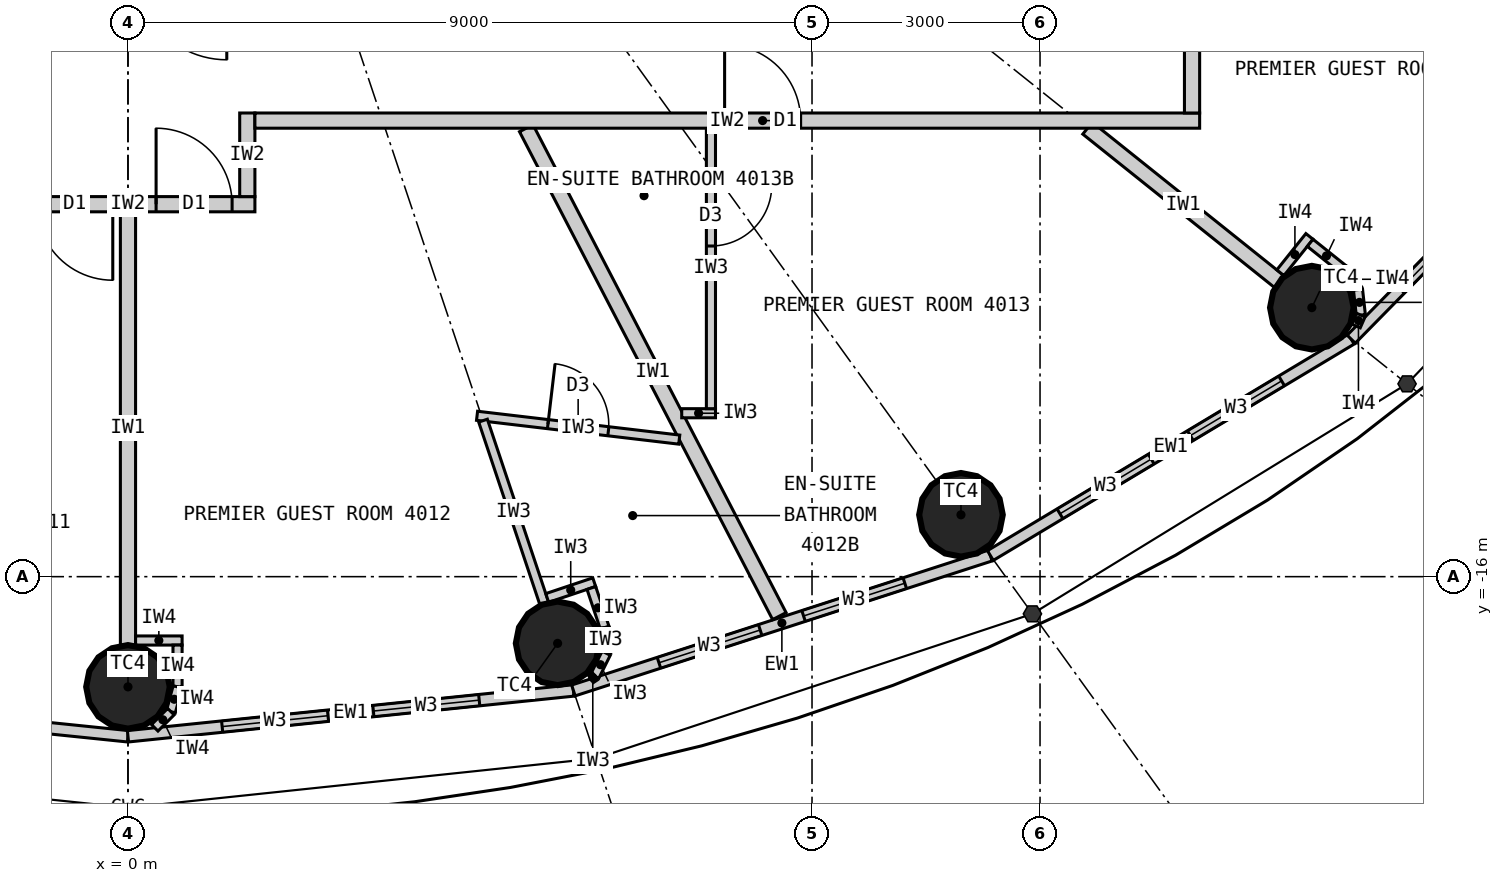
"""IFC4 building model, lengths in metres.
Left out: names, types, materials, properties, quantities, classifications, styles, units other than length and angle.
Written with IfcOpenShell. Run it as: python <this file> out.ifc"""

import sys

from ifc_helpers import new_model, si_unit, direction, frame, frame_2d, origin, origin_2d, place, context, subcontext, project, spatial, rectangle, circle, extrude, element, fill, save


model = new_model("IFC4")
c1 = context("Model", 3, precision=1e-05, world=origin(), true_north=direction((0.0, 1.0)))
c2 = subcontext(c1, "Body", "Model", "MODEL_VIEW")
j1 = project(units=[si_unit("LENGTHUNIT", "METRE"), si_unit("PLANEANGLEUNIT", "RADIAN")], contexts=[c1])
p1 = place(None, origin())
s1 = spatial("IfcSite", under=j1, at=p1, CompositionType="ELEMENT")
p2 = place(p1, origin())
s2 = spatial("IfcBuilding", under=s1, at=p2, CompositionType="ELEMENT")
p3 = place(p2, frame((0.0, 0.0, 153.3)))
s3 = spatial("IfcBuildingStorey", under=s2, at=p3, CompositionType="ELEMENT", Elevation=153.3)
for number, where, z_axis, x_axis in (
    (1, (0.0, -17.45, 0.0), (0.0, 0.0, 1.0), (1.0, 0.0, 0.0)),
    (2, (5.653, -16.877, 0.0), (0.0, 0.0, 1.0), (1.0, 0.0, 0.0)),
    (3, (10.96, -15.186, 0.0), (0.0, 0.0, 1.0), (1.0, 0.0, 0.0)),
    (4, (15.576, -12.461, 0.0), (0.0, 0.0, 1.0), (1.0, 0.0, 0.0)),
):
    element("IfcColumn", number, at=place(p3, frame(where, z_axis=z_axis, x_axis=x_axis)), inside=s3, PredefinedType="COLUMN", context=c2, shape_type="SweptSolid", body=[
        extrude(circle(Radius=0.55, at=origin_2d()), origin(), (0.0, 0.0, 1.0), 3.3),
    ])
p4 = place(p3, frame((-5.86, -17.497, 0.0), z_axis=(0.0, 0.0, 1.0), x_axis=(0.994751738032, -0.102318032045, 0.0)))
e5 = element("IfcWall", 5, at=p4, inside=s3, PredefinedType="ELEMENTEDWALL", context=c2, shape_type="SweptSolid", body=[
    extrude(rectangle(XDim=5.891, YDim=0.15, at=frame_2d((2.946, 0.0))), origin(), (0.0, 0.0, 1.0), 3.12),
])
p5 = place(p4, frame((1.246, 0.0, 0.9)))
e6 = element("IfcOpeningElement", 6, at=p5, cuts=e5, PredefinedType="OPENING", context=c2, shape_type="SweptSolid", body=[
    extrude(rectangle(XDim=1.4, YDim=1.9, at=frame_2d((0.7, 0.95))), frame((0.0, 0.085, 0.0), z_axis=(0.0, -1.0, 0.0), x_axis=(1.0, 0.0, 0.0)), (0.0, 0.0, 1.0), 0.17),
])
p6 = place(p4, frame((3.246, 0.0, 0.9)))
e7 = element("IfcOpeningElement", 7, at=p6, cuts=e5, PredefinedType="OPENING", context=c2, shape_type="SweptSolid", body=[
    extrude(rectangle(XDim=1.4, YDim=1.9, at=frame_2d((0.7, 0.95))), frame((0.0, 0.085, 0.0), z_axis=(0.0, -1.0, 0.0), x_axis=(1.0, 0.0, 0.0)), (0.0, 0.0, 1.0), 0.17),
])
p7 = place(p3, frame((0.0, -18.1, 0.0), z_axis=(0.0, 0.0, 1.0), x_axis=(0.994751738032, 0.102318032045, 0.0)))
e8 = element("IfcWall", 8, at=p7, inside=s3, PredefinedType="ELEMENTEDWALL", context=c2, shape_type="SweptSolid", body=[
    extrude(rectangle(XDim=5.891, YDim=0.15, at=frame_2d((2.946, 0.0))), origin(), (0.0, 0.0, 1.0), 3.12),
])
p8 = place(p7, frame((1.246, 0.0, 0.9)))
e9 = element("IfcOpeningElement", 9, at=p8, cuts=e8, PredefinedType="OPENING", context=c2, shape_type="SweptSolid", body=[
    extrude(rectangle(XDim=1.4, YDim=1.9, at=frame_2d((0.7, 0.95))), frame((0.0, 0.085, 0.0), z_axis=(0.0, -1.0, 0.0), x_axis=(1.0, 0.0, 0.0)), (0.0, 0.0, 1.0), 0.17),
])
p9 = place(p7, frame((3.246, 0.0, 0.9)))
e10 = element("IfcOpeningElement", 10, at=p9, cuts=e8, PredefinedType="OPENING", context=c2, shape_type="SweptSolid", body=[
    extrude(rectangle(XDim=1.4, YDim=1.9, at=frame_2d((0.7, 0.95))), frame((0.0, 0.085, 0.0), z_axis=(0.0, -1.0, 0.0), x_axis=(1.0, 0.0, 0.0)), (0.0, 0.0, 1.0), 0.17),
])
p10 = place(p3, frame((5.86, -17.497, 0.0), z_axis=(0.0, 0.0, 1.0), x_axis=(0.951432482129, 0.307857486429, 0.0)))
e11 = element("IfcWall", 11, at=p10, inside=s3, PredefinedType="ELEMENTEDWALL", context=c2, shape_type="SweptSolid", body=[
    extrude(rectangle(XDim=5.766, YDim=0.15, at=frame_2d((2.883, 0.0))), origin(), (0.0, 0.0, 1.0), 3.12),
])
p11 = place(p10, frame((1.183, 0.0, 0.9)))
e12 = element("IfcOpeningElement", 12, at=p11, cuts=e11, PredefinedType="OPENING", context=c2, shape_type="SweptSolid", body=[
    extrude(rectangle(XDim=1.4, YDim=1.9, at=frame_2d((0.7, 0.95))), frame((0.0, 0.085, 0.0), z_axis=(0.0, -1.0, 0.0), x_axis=(1.0, 0.0, 0.0)), (0.0, 0.0, 1.0), 0.17),
])
p12 = place(p10, frame((3.183, 0.0, 0.9)))
e13 = element("IfcOpeningElement", 13, at=p12, cuts=e11, PredefinedType="OPENING", context=c2, shape_type="SweptSolid", body=[
    extrude(rectangle(XDim=1.4, YDim=1.9, at=frame_2d((0.7, 0.95))), frame((0.0, 0.085, 0.0), z_axis=(0.0, -1.0, 0.0), x_axis=(1.0, 0.0, 0.0)), (0.0, 0.0, 1.0), 0.17),
])
p13 = place(p3, frame((11.346, -15.722, 0.0), z_axis=(0.0, 0.0, 1.0), x_axis=(0.857695199231, 0.514158482587, 0.0)))
e14 = element("IfcWall", 14, at=p13, inside=s3, PredefinedType="ELEMENTEDWALL", context=c2, shape_type="SweptSolid", body=[
    extrude(rectangle(XDim=5.536, YDim=0.15, at=frame_2d((2.768, 0.0))), origin(), (0.0, 0.0, 1.0), 3.12),
])
p14 = place(p13, frame((1.068, 0.0, 0.9)))
e15 = element("IfcOpeningElement", 15, at=p14, cuts=e14, PredefinedType="OPENING", context=c2, shape_type="SweptSolid", body=[
    extrude(rectangle(XDim=1.4, YDim=1.9, at=frame_2d((0.7, 0.95))), frame((0.0, 0.085, 0.0), z_axis=(0.0, -1.0, 0.0), x_axis=(1.0, 0.0, 0.0)), (0.0, 0.0, 1.0), 0.17),
])
p15 = place(p13, frame((3.068, 0.0, 0.9)))
e16 = element("IfcOpeningElement", 16, at=p15, cuts=e14, PredefinedType="OPENING", context=c2, shape_type="SweptSolid", body=[
    extrude(rectangle(XDim=1.4, YDim=1.9, at=frame_2d((0.7, 0.95))), frame((0.0, 0.085, 0.0), z_axis=(0.0, -1.0, 0.0), x_axis=(1.0, 0.0, 0.0)), (0.0, 0.0, 1.0), 0.17),
])
p16 = place(p3, frame((16.095, -12.876, 0.0), z_axis=(0.0, 0.0, 1.0), x_axis=(0.700727467776, 0.71342905457, 0.0)))
e17 = element("IfcWall", 17, at=p16, inside=s3, PredefinedType="ELEMENTEDWALL", context=c2, shape_type="SweptSolid", body=[
    extrude(rectangle(XDim=5.247, YDim=0.15, at=frame_2d((2.624, 0.0))), origin(), (0.0, 0.0, 1.0), 3.12),
])
p17 = place(p16, frame((0.924, 0.0, 0.9)))
e18 = element("IfcOpeningElement", 18, at=p17, cuts=e17, PredefinedType="OPENING", context=c2, shape_type="SweptSolid", body=[
    extrude(rectangle(XDim=1.4, YDim=1.9, at=frame_2d((0.7, 0.95))), frame((0.0, 0.085, 0.0), z_axis=(0.0, -1.0, 0.0), x_axis=(1.0, 0.0, 0.0)), (0.0, 0.0, 1.0), 0.17),
])
p18 = place(p16, frame((2.924, 0.0, 0.9)))
e19 = element("IfcOpeningElement", 19, at=p18, cuts=e17, PredefinedType="OPENING", context=c2, shape_type="SweptSolid", body=[
    extrude(rectangle(XDim=1.4, YDim=1.9, at=frame_2d((0.7, 0.95))), frame((0.0, 0.085, 0.0), z_axis=(0.0, -1.0, 0.0), x_axis=(1.0, 0.0, 0.0)), (0.0, 0.0, 1.0), 0.17),
])
p19 = place(p3, frame((0.0, -11.2, 0.0), z_axis=(0.0, 0.0, 1.0), x_axis=(0.0, -1.0, 0.0)))
e20 = element("IfcWall", 20, at=p19, inside=s3, PredefinedType="PARTITIONING", context=c2, shape_type="SweptSolid", body=[
    extrude(rectangle(XDim=5.7, YDim=0.2, at=frame_2d((2.85, 0.0))), origin(), (0.0, 0.0, 1.0), 2.42),
])
p20 = place(p3, frame((5.24, -10.1, 0.0), z_axis=(0.0, 0.0, 1.0), x_axis=(0.460532965373, -0.887642601391, 0.0)))
e21 = element("IfcWall", 21, at=p20, inside=s3, PredefinedType="PARTITIONING", context=c2, shape_type="SweptSolid", body=[
    extrude(rectangle(XDim=7.231, YDim=0.2, at=frame_2d((3.616, 0.0))), origin(), (0.0, 0.0, 1.0), 3.12),
])
p21 = place(p3, frame((12.625, -10.1, 0.0), z_axis=(0.0, 0.0, 1.0), x_axis=(0.780876185034, -0.624685827954, 0.0)))
e22 = element("IfcWall", 22, at=p21, inside=s3, PredefinedType="PARTITIONING", context=c2, shape_type="SweptSolid", body=[
    extrude(rectangle(XDim=3.229, YDim=0.2, at=frame_2d((1.615, 0.0))), origin(), (0.0, 0.0, 1.0), 2.42),
])
p22 = place(p3, frame((1.67, -11.1, 0.0), z_axis=(0.0, 0.0, 1.0), x_axis=(-1.0, 0.0, 0.0)))
e23 = element("IfcWall", 23, at=p22, inside=s3, PredefinedType="PARTITIONING", context=c2, shape_type="SweptSolid", body=[
    extrude(rectangle(XDim=3.34, YDim=0.2, at=frame_2d((1.67, 0.0))), origin(), (0.0, 0.0, 1.0), 3.12),
])
p23 = place(p22, frame((1.87, 0.0, 0.0)))
e24 = element("IfcOpeningElement", 24, at=p23, cuts=e23, PredefinedType="OPENING", context=c2, shape_type="SweptSolid", body=[
    extrude(rectangle(XDim=1.0, YDim=2.2, at=frame_2d((0.5, 1.1))), frame((0.0, 0.11, 0.0), z_axis=(0.0, -1.0, 0.0), x_axis=(1.0, 0.0, 0.0)), (0.0, 0.0, 1.0), 0.22),
])
p24 = place(p22, frame((0.3, 0.0, 0.0)))
e25 = element("IfcOpeningElement", 25, at=p24, cuts=e23, PredefinedType="OPENING", context=c2, shape_type="SweptSolid", body=[
    extrude(rectangle(XDim=1.0, YDim=2.2, at=frame_2d((0.5, 1.1))), frame((0.0, 0.11, 0.0), z_axis=(0.0, -1.0, 0.0), x_axis=(1.0, 0.0, 0.0)), (0.0, 0.0, 1.0), 0.22),
])
p25 = place(p3, frame((1.57, -9.9, 0.0), z_axis=(0.0, 0.0, 1.0), x_axis=(0.0, -1.0, 0.0)))
e26 = element("IfcWall", 26, at=p25, inside=s3, PredefinedType="PARTITIONING", context=c2, shape_type="SweptSolid", body=[
    extrude(rectangle(XDim=1.1, YDim=0.2, at=frame_2d((0.55, 0.0))), origin(), (0.0, 0.0, 1.0), 3.12),
])
p26 = place(p3, frame((7.253, -14.197, 0.0), z_axis=(0.0, 0.0, 1.0), x_axis=(-0.993128188393, 0.117031625725, 0.0)))
e27 = element("IfcWall", 27, at=p26, inside=s3, PredefinedType="PARTITIONING", context=c2, shape_type="SweptSolid", body=[
    extrude(rectangle(XDim=2.678, YDim=0.12, at=frame_2d((1.339, 0.0))), origin(), (0.0, 0.0, 1.0), 3.12),
])
p27 = place(p26, frame((0.939, 0.0, 0.0)))
e28 = element("IfcOpeningElement", 28, at=p27, cuts=e27, PredefinedType="OPENING", context=c2, shape_type="SweptSolid", body=[
    extrude(rectangle(XDim=0.8, YDim=2.1, at=frame_2d((0.4, 1.05))), frame((0.0, 0.07, 0.0), z_axis=(0.0, -1.0, 0.0), x_axis=(1.0, 0.0, 0.0)), (0.0, 0.0, 1.0), 0.14),
])
p28 = place(p3, frame((4.671, -13.948, 0.0), z_axis=(0.0, 0.0, 1.0), x_axis=(0.317669167093, -0.948201613729, 0.0)))
e29 = element("IfcWall", 29, at=p28, inside=s3, PredefinedType="PARTITIONING", context=c2, shape_type="SweptSolid", body=[
    extrude(rectangle(XDim=2.54, YDim=0.12, at=frame_2d((1.27, 0.0))), origin(), (0.0, 0.0, 1.0), 2.42),
])
p29 = place(p3, frame((5.516, -16.28, 0.0), z_axis=(0.0, 0.0, 1.0), x_axis=(0.948157944392, 0.317799484717, 0.0)))
e30 = element("IfcWall", 30, at=p29, inside=s3, PredefinedType="PARTITIONING", context=c2, shape_type="SweptSolid", body=[
    extrude(rectangle(XDim=0.652, YDim=0.12, at=frame_2d((0.326, 0.0))), origin(), (0.0, 0.0, 1.0), 3.12),
])
p30 = place(p3, frame((6.097, -16.149, 0.0), z_axis=(0.0, 0.0, 1.0), x_axis=(0.317292604854, -0.948327687514, 0.0)))
e31 = element("IfcWall", 31, at=p30, inside=s3, PredefinedType="PARTITIONING", context=c2, shape_type="SweptSolid", body=[
    extrude(rectangle(XDim=0.55, YDim=0.12, at=frame_2d((0.275, 0.0))), origin(), (0.0, 0.0, 1.0), 3.12),
])
for number, where, z_axis, x_axis in (
    (32, (6.271, -16.67, 0.0), (0.0, 0.0, 1.0), (0.061, -0.998, 0.0)),
    (33, (6.292, -17.007, 0.0), (0.0, 0.0, 1.0), (-0.445, -0.895, 0.0)),
):
    element("IfcWall", number, at=place(p3, frame(where, z_axis=z_axis, x_axis=x_axis)), inside=s3, PredefinedType="PARTITIONING", context=c2, shape_type="SweptSolid", body=[
        extrude(rectangle(XDim=0.338, YDim=0.12, at=frame_2d((0.169, 0.0))), origin(), (0.0, 0.0, 1.0), 3.12),
    ])
p31 = place(p3, frame((6.142, -17.31, 0.0), z_axis=(0.0, 0.0, 1.0), x_axis=(-0.835039693181, -0.550189704386, 0.0)))
e34 = element("IfcWall", 34, at=p31, inside=s3, PredefinedType="PARTITIONING", context=c2, shape_type="SweptSolid", body=[
    extrude(rectangle(XDim=0.062, YDim=0.12, at=frame_2d((0.031, 0.0))), origin(), (0.0, 0.0, 1.0), 3.12),
])
p32 = place(p3, frame((7.286, -13.85, 0.0), z_axis=(0.0, 0.0, 1.0), x_axis=(1.0, 0.0, 0.0)))
e35 = element("IfcWall", 35, at=p32, inside=s3, PredefinedType="PARTITIONING", context=c2, shape_type="SweptSolid", body=[
    extrude(rectangle(XDim=0.444, YDim=0.12, at=frame_2d((0.222, 0.0))), origin(), (0.0, 0.0, 1.0), 3.12),
])
p33 = place(p3, frame((7.67, -10.1, 0.0), z_axis=(0.0, 0.0, 1.0), x_axis=(0.0, -1.0, 0.0)))
e36 = element("IfcWall", 36, at=p33, inside=s3, PredefinedType="PARTITIONING", context=c2, shape_type="SweptSolid", body=[
    extrude(rectangle(XDim=3.69, YDim=0.12, at=frame_2d((1.845, 0.0))), origin(), (0.0, 0.0, 1.0), 3.12),
])
p34 = place(p33, frame((0.75, 0.0, 0.0)))
e37 = element("IfcOpeningElement", 37, at=p34, cuts=e36, PredefinedType="OPENING", context=c2, shape_type="SweptSolid", body=[
    extrude(rectangle(XDim=0.8, YDim=2.1, at=frame_2d((0.4, 1.05))), frame((0.0, 0.07, 0.0), z_axis=(0.0, -1.0, 0.0), x_axis=(1.0, 0.0, 0.0)), (0.0, 0.0, 1.0), 0.14),
])
p35 = place(p3, frame((14.1, -10.0, 0.0), z_axis=(0.0, 0.0, 1.0), x_axis=(-1.0, 0.0, 0.0)))
e38 = element("IfcWall", 38, at=p35, inside=s3, PredefinedType="PARTITIONING", context=c2, shape_type="SweptSolid", body=[
    extrude(rectangle(XDim=12.43, YDim=0.2, at=frame_2d((6.215, 0.0))), origin(), (0.0, 0.0, 1.0), 3.12),
])
p36 = place(p35, frame((5.25, 0.0, 0.0)))
e39 = element("IfcOpeningElement", 39, at=p36, cuts=e38, PredefinedType="OPENING", context=c2, shape_type="SweptSolid", body=[
    extrude(rectangle(XDim=1.0, YDim=2.2, at=frame_2d((0.5, 1.1))), frame((0.0, 0.11, 0.0), z_axis=(0.0, -1.0, 0.0), x_axis=(1.0, 0.0, 0.0)), (0.0, 0.0, 1.0), 0.22),
])
p37 = place(p3, frame((14.0, -9.9, 0.0), z_axis=(0.0, 0.0, 1.0), x_axis=(0.0, 1.0, 0.0)))
e40 = element("IfcWall", 40, at=p37, inside=s3, PredefinedType="PARTITIONING", context=c2, shape_type="SweptSolid", body=[
    extrude(rectangle(XDim=8.23, YDim=0.2, at=frame_2d((4.115, 0.0))), origin(), (0.0, 0.0, 1.0), 3.12),
])
p38 = place(p37, frame((1.678, 0.0, 0.0)))
e41 = element("IfcOpeningElement", 41, at=p38, cuts=e40, PredefinedType="OPENING", context=c2, shape_type="SweptSolid", body=[
    extrude(rectangle(XDim=1.0, YDim=2.2, at=frame_2d((0.5, 1.1))), frame((0.0, 0.11, 0.0), z_axis=(0.0, -1.0, 0.0), x_axis=(1.0, 0.0, 0.0)), (0.0, 0.0, 1.0), 0.22),
])
p39 = place(p3, frame((0.1, -16.84, 0.0), z_axis=(0.0, 0.0, 1.0), x_axis=(1.0, 0.0, 0.0)))
e42 = element("IfcWall", 42, at=p39, inside=s3, PredefinedType="PARTITIONING", context=c2, shape_type="SweptSolid", body=[
    extrude(rectangle(XDim=0.612, YDim=0.12, at=frame_2d((0.306, 0.0))), origin(), (0.0, 0.0, 1.0), 3.12),
])
p40 = place(p3, frame((0.652, -16.9, 0.0), z_axis=(0.0, 0.0, 1.0), x_axis=(0.0, -1.0, 0.0)))
e43 = element("IfcWall", 43, at=p40, inside=s3, PredefinedType="PARTITIONING", context=c2, shape_type="SweptSolid", body=[
    extrude(rectangle(XDim=0.55, YDim=0.12, at=frame_2d((0.275, 0.0))), origin(), (0.0, 0.0, 1.0), 3.12),
])
p41 = place(p3, frame((0.652, -17.45, 0.0), z_axis=(0.0, 0.0, 1.0), x_axis=(-0.258832454679, -0.965922233104, 0.0)))
e44 = element("IfcWall", 44, at=p41, inside=s3, PredefinedType="PARTITIONING", context=c2, shape_type="SweptSolid", body=[
    extrude(rectangle(XDim=0.338, YDim=0.12, at=frame_2d((0.169, 0.0))), origin(), (0.0, 0.0, 1.0), 3.12),
])
p42 = place(p3, frame((0.565, -17.776, 0.0), z_axis=(0.0, 0.0, 1.0), x_axis=(-0.707106781187, -0.707106781187, 0.0)))
e45 = element("IfcWall", 45, at=p42, inside=s3, PredefinedType="PARTITIONING", context=c2, shape_type="SweptSolid", body=[
    extrude(rectangle(XDim=0.301, YDim=0.12, at=frame_2d((0.15, 0.0))), origin(), (0.0, 0.0, 1.0), 3.12),
])
p43 = place(p3, frame((15.162, -12.002, 0.0), z_axis=(0.0, 0.0, 1.0), x_axis=(0.624597762427, 0.780946627607, 0.0)))
e46 = element("IfcWall", 46, at=p43, inside=s3, PredefinedType="PARTITIONING", context=c2, shape_type="SweptSolid", body=[
    extrude(rectangle(XDim=0.612, YDim=0.12, at=frame_2d((0.306, 0.0))), origin(), (0.0, 0.0, 1.0), 3.12),
])
p44 = place(p3, frame((15.554, -11.608, 0.0), z_axis=(0.0, 0.0, 1.0), x_axis=(0.780695577787, -0.624911525597, 0.0)))
e47 = element("IfcWall", 47, at=p44, inside=s3, PredefinedType="PARTITIONING", context=c2, shape_type="SweptSolid", body=[
    extrude(rectangle(XDim=0.55, YDim=0.12, at=frame_2d((0.275, 0.0))), origin(), (0.0, 0.0, 1.0), 3.12),
])
p45 = place(p3, frame((15.984, -11.952, 0.0), z_axis=(0.0, 0.0, 1.0), x_axis=(0.592335221171, -0.805691619517, 0.0)))
e48 = element("IfcWall", 48, at=p45, inside=s3, PredefinedType="PARTITIONING", context=c2, shape_type="SweptSolid", body=[
    extrude(rectangle(XDim=0.338, YDim=0.12, at=frame_2d((0.169, 0.0))), origin(), (0.0, 0.0, 1.0), 3.12),
])
p46 = place(p3, frame((16.184, -12.224, 0.0), z_axis=(0.0, 0.0, 1.0), x_axis=(0.110669692975, -0.993857242795, 0.0)))
e49 = element("IfcWall", 49, at=p46, inside=s3, PredefinedType="PARTITIONING", context=c2, shape_type="SweptSolid", body=[
    extrude(rectangle(XDim=0.337, YDim=0.12, at=frame_2d((0.169, 0.0))), origin(), (0.0, 0.0, 1.0), 3.12),
])
p47 = place(p3, frame((16.221, -12.559, 0.0), z_axis=(0.0, 0.0, 1.0), x_axis=(-0.401064416249, -0.916049853457, 0.0)))
e50 = element("IfcWall", 50, at=p47, inside=s3, PredefinedType="PARTITIONING", context=c2, shape_type="SweptSolid", body=[
    extrude(rectangle(XDim=0.156, YDim=0.12, at=frame_2d((0.078, 0.0))), origin(), (0.0, 0.0, 1.0), 3.12),
])
p48 = place(p8, origin())
e51 = element("IfcWindow", 51, at=p48, inside=s3, PartitioningType="SINGLE_PANEL", PredefinedType="WINDOW", context=c2, shape_type="SweptSolid", body=[
    extrude(rectangle(XDim=1.4, YDim=1.9, at=frame_2d((0.7, 0.95))), frame((0.0, 0.03, 0.0), z_axis=(0.0, -1.0, 0.0), x_axis=(1.0, 0.0, 0.0)), (0.0, 0.0, 1.0), 0.06),
])
fill(e9, e51)
p49 = place(p9, origin())
e52 = element("IfcWindow", 52, at=p49, inside=s3, PartitioningType="SINGLE_PANEL", PredefinedType="WINDOW", context=c2, shape_type="SweptSolid", body=[
    extrude(rectangle(XDim=1.4, YDim=1.9, at=frame_2d((0.7, 0.95))), frame((0.0, 0.03, 0.0), z_axis=(0.0, -1.0, 0.0), x_axis=(1.0, 0.0, 0.0)), (0.0, 0.0, 1.0), 0.06),
])
fill(e10, e52)
p50 = place(p11, origin())
e53 = element("IfcWindow", 53, at=p50, inside=s3, PartitioningType="SINGLE_PANEL", PredefinedType="WINDOW", context=c2, shape_type="SweptSolid", body=[
    extrude(rectangle(XDim=1.4, YDim=1.9, at=frame_2d((0.7, 0.95))), frame((0.0, 0.03, 0.0), z_axis=(0.0, -1.0, 0.0), x_axis=(1.0, 0.0, 0.0)), (0.0, 0.0, 1.0), 0.06),
])
fill(e12, e53)
p51 = place(p12, origin())
e54 = element("IfcWindow", 54, at=p51, inside=s3, PartitioningType="SINGLE_PANEL", PredefinedType="WINDOW", context=c2, shape_type="SweptSolid", body=[
    extrude(rectangle(XDim=1.4, YDim=1.9, at=frame_2d((0.7, 0.95))), frame((0.0, 0.03, 0.0), z_axis=(0.0, -1.0, 0.0), x_axis=(1.0, 0.0, 0.0)), (0.0, 0.0, 1.0), 0.06),
])
fill(e13, e54)
p52 = place(p14, origin())
e55 = element("IfcWindow", 55, at=p52, inside=s3, PartitioningType="SINGLE_PANEL", PredefinedType="WINDOW", context=c2, shape_type="SweptSolid", body=[
    extrude(rectangle(XDim=1.4, YDim=1.9, at=frame_2d((0.7, 0.95))), frame((0.0, 0.03, 0.0), z_axis=(0.0, -1.0, 0.0), x_axis=(1.0, 0.0, 0.0)), (0.0, 0.0, 1.0), 0.06),
])
fill(e15, e55)
p53 = place(p15, origin())
e56 = element("IfcWindow", 56, at=p53, inside=s3, PartitioningType="SINGLE_PANEL", PredefinedType="WINDOW", context=c2, shape_type="SweptSolid", body=[
    extrude(rectangle(XDim=1.4, YDim=1.9, at=frame_2d((0.7, 0.95))), frame((0.0, 0.03, 0.0), z_axis=(0.0, -1.0, 0.0), x_axis=(1.0, 0.0, 0.0)), (0.0, 0.0, 1.0), 0.06),
])
fill(e16, e56)
p54 = place(p17, origin())
e57 = element("IfcWindow", 57, at=p54, inside=s3, PartitioningType="SINGLE_PANEL", PredefinedType="WINDOW", context=c2, shape_type="SweptSolid", body=[
    extrude(rectangle(XDim=1.4, YDim=1.9, at=frame_2d((0.7, 0.95))), frame((0.0, 0.03, 0.0), z_axis=(0.0, -1.0, 0.0), x_axis=(1.0, 0.0, 0.0)), (0.0, 0.0, 1.0), 0.06),
])
fill(e18, e57)
p55 = place(p23, origin())
e58 = element("IfcDoor", 58, at=p55, inside=s3, OperationType="SINGLE_SWING_LEFT", PredefinedType="DOOR", context=c2, shape_type="SweptSolid", body=[
    extrude(rectangle(XDim=1.0, YDim=2.2, at=frame_2d((0.5, 1.1))), frame((0.0, 0.025, 0.0), z_axis=(0.0, -1.0, 0.0), x_axis=(1.0, 0.0, 0.0)), (0.0, 0.0, 1.0), 0.05),
])
fill(e24, e58)
p56 = place(p27, origin())
e59 = element("IfcDoor", 59, at=p56, inside=s3, OperationType="SINGLE_SWING_RIGHT", PredefinedType="DOOR", context=c2, shape_type="SweptSolid", body=[
    extrude(rectangle(XDim=0.8, YDim=2.1, at=frame_2d((0.4, 1.05))), frame((0.0, 0.025, 0.0), z_axis=(0.0, -1.0, 0.0), x_axis=(1.0, 0.0, 0.0)), (0.0, 0.0, 1.0), 0.05),
])
fill(e28, e59)
p57 = place(p24, origin())
e60 = element("IfcDoor", 60, at=p57, inside=s3, OperationType="SINGLE_SWING_RIGHT", PredefinedType="DOOR", context=c2, shape_type="SweptSolid", body=[
    extrude(rectangle(XDim=1.0, YDim=2.2, at=frame_2d((0.5, 1.1))), frame((0.0, 0.025, 0.0), z_axis=(0.0, -1.0, 0.0), x_axis=(1.0, 0.0, 0.0)), (0.0, 0.0, 1.0), 0.05),
])
fill(e25, e60)
p58 = place(p34, origin())
e61 = element("IfcDoor", 61, at=p58, inside=s3, OperationType="SINGLE_SWING_LEFT", PredefinedType="DOOR", context=c2, shape_type="SweptSolid", body=[
    extrude(rectangle(XDim=0.8, YDim=2.1, at=frame_2d((0.4, 1.05))), frame((0.0, 0.025, 0.0), z_axis=(0.0, -1.0, 0.0), x_axis=(1.0, 0.0, 0.0)), (0.0, 0.0, 1.0), 0.05),
])
fill(e37, e61)
p59 = place(p36, origin())
e62 = element("IfcDoor", 62, at=p59, inside=s3, OperationType="SINGLE_SWING_RIGHT", PredefinedType="DOOR", context=c2, shape_type="SweptSolid", body=[
    extrude(rectangle(XDim=1.0, YDim=2.2, at=frame_2d((0.5, 1.1))), frame((0.0, 0.025, 0.0), z_axis=(0.0, -1.0, 0.0), x_axis=(1.0, 0.0, 0.0)), (0.0, 0.0, 1.0), 0.05),
])
fill(e39, e62)
save(model, sys.argv[1])
